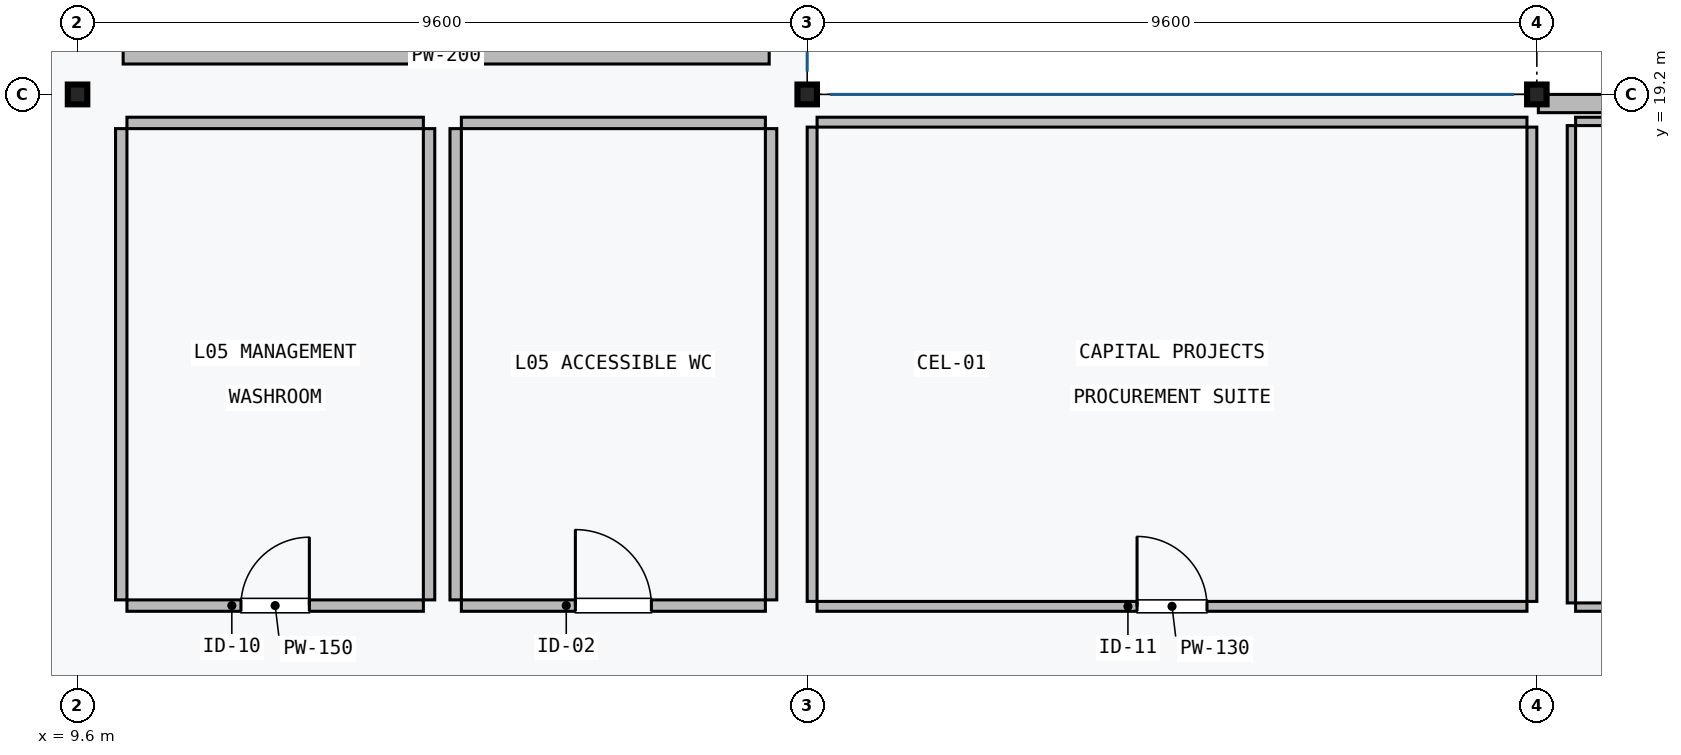
"""IFC4 building model, lengths in metres.
Left out: names, types, materials, properties, quantities, classifications, styles, units other than length and angle.
Written with IfcOpenShell. Run it as: python <this file> out.ifc"""

import sys

from ifc_helpers import new_model, si_unit, direction, frame, frame_2d, origin, origin_2d, place, context, subcontext, project, spatial, rectangle, i_section, extrude, element, fill, save


model = new_model("IFC4")
c1 = context("Model", 3, precision=1e-05, world=origin(), true_north=direction((0.0, 1.0)))
c2 = subcontext(c1, "Body", "Model", "MODEL_VIEW")
j1 = project(units=[si_unit("LENGTHUNIT", "METRE"), si_unit("PLANEANGLEUNIT", "RADIAN")], contexts=[c1])
p1 = place(None, origin())
s1 = spatial("IfcSite", under=j1, at=p1, CompositionType="ELEMENT")
p2 = place(p1, origin())
s2 = spatial("IfcBuilding", under=s1, at=p2, CompositionType="ELEMENT")
p3 = place(p2, frame((0.0, 0.0, 23.1)))
s3 = spatial("IfcBuildingStorey", under=s2, at=p3, CompositionType="ELEMENT", Elevation=23.1)
for number, where, z_axis, x_axis in (
    (1, (9.6, 19.2, 0.0), (0.0, 0.0, 1.0), (1.0, 0.0, 0.0)),
    (2, (19.2, 19.2, 0.0), (0.0, 0.0, 1.0), (1.0, 0.0, 0.0)),
    (3, (28.8, 19.2, 0.0), (0.0, 0.0, 1.0), (1.0, 0.0, 0.0)),
):
    element("IfcColumn", number, at=place(p3, frame(where, z_axis=z_axis, x_axis=x_axis)), inside=s3, PredefinedType="COLUMN", context=c2, shape_type="SweptSolid", body=[
        extrude(i_section(OverallWidth=0.256, OverallDepth=0.26, WebThickness=0.01, FlangeThickness=0.017, FilletRadius=0.013, at=origin_2d()), origin(), (0.0, 0.0, 1.0), 3.92),
    ])
p4 = place(p3, frame((28.82, 19.08, 0.0), z_axis=(0.0, 0.0, 1.0), x_axis=(1.0, 0.0, 0.0)))
e4 = element("IfcWall", 4, at=p4, inside=s3, PredefinedType="SOLIDWALL", context=c2, shape_type="SweptSolid", body=[
    extrude(rectangle(XDim=9.56, YDim=0.24, at=frame_2d((4.78, 0.0))), origin(), (0.0, 0.0, 1.0), 3.63),
])
p5 = place(p4, frame((4.18, 0.0, 0.9)))
e5 = element("IfcOpeningElement", 5, at=p5, cuts=e4, PredefinedType="OPENING", context=c2, shape_type="SweptSolid", body=[
    extrude(rectangle(XDim=1.2, YDim=1.8, at=frame_2d((0.6, 0.9))), frame((0.0, 0.13, 0.0), z_axis=(0.0, -1.0, 0.0), x_axis=(1.0, 0.0, 0.0)), (0.0, 0.0, 1.0), 0.26),
])
p6 = place(p3, frame((45.99, 12.455, 0.0), z_axis=(0.0, 0.0, 1.0), x_axis=(-1.0, 0.0, 0.0)))
e6 = element("IfcWall", 6, at=p6, inside=s3, PredefinedType="PARTITIONING", context=c2, shape_type="SweptSolid", body=[
    extrude(rectangle(XDim=16.68, YDim=0.11, at=frame_2d((8.34, 0.0))), origin(), (0.0, 0.0, 1.0), 3.453),
])
p7 = place(p6, frame((3.6, 0.0, 0.0)))
e7 = element("IfcOpeningElement", 7, at=p7, cuts=e6, PredefinedType="OPENING", context=c2, shape_type="SweptSolid", body=[
    extrude(rectangle(XDim=0.95, YDim=2.15, at=frame_2d((0.475, 1.075))), frame((0.0, 0.065, 0.0), z_axis=(0.0, -1.0, 0.0), x_axis=(1.0, 0.0, 0.0)), (0.0, 0.0, 1.0), 0.13),
])
p8 = place(p3, frame((29.31, 18.845, 0.0), z_axis=(0.0, 0.0, 1.0), x_axis=(1.0, 0.0, 0.0)))
e8 = element("IfcWall", 8, at=p8, inside=s3, PredefinedType="PARTITIONING", context=c2, shape_type="SweptSolid", body=[
    extrude(rectangle(XDim=16.68, YDim=0.11, at=frame_2d((8.34, 0.0))), origin(), (0.0, 0.0, 1.0), 3.453),
])
p9 = place(p3, frame((29.255, 12.51, 0.0), z_axis=(0.0, 0.0, 1.0), x_axis=(0.0, 1.0, 0.0)))
e9 = element("IfcWall", 9, at=p9, inside=s3, PredefinedType="PARTITIONING", context=c2, shape_type="SweptSolid", body=[
    extrude(rectangle(XDim=6.28, YDim=0.11, at=frame_2d((3.14, 0.0))), origin(), (0.0, 0.0, 1.0), 3.56),
])
p10 = place(p3, frame((28.67, 12.465, 0.0), z_axis=(0.0, 0.0, 1.0), x_axis=(-1.0, 0.0, 0.0)))
e10 = element("IfcWall", 10, at=p10, inside=s3, PredefinedType="PARTITIONING", context=c2, shape_type="SweptSolid", body=[
    extrude(rectangle(XDim=9.34, YDim=0.13, at=frame_2d((4.67, 0.0))), origin(), (0.0, 0.0, 1.0), 3.453),
])
p11 = place(p10, frame((4.21, 0.0, 0.0)))
e11 = element("IfcOpeningElement", 11, at=p11, cuts=e10, PredefinedType="OPENING", context=c2, shape_type="SweptSolid", body=[
    extrude(rectangle(XDim=0.92, YDim=2.15, at=frame_2d((0.46, 1.075))), frame((0.0, 0.075, 0.0), z_axis=(0.0, -1.0, 0.0), x_axis=(1.0, 0.0, 0.0)), (0.0, 0.0, 1.0), 0.15),
])
p12 = place(p3, frame((19.33, 18.835, 0.0), z_axis=(0.0, 0.0, 1.0), x_axis=(1.0, 0.0, 0.0)))
e12 = element("IfcWall", 12, at=p12, inside=s3, PredefinedType="PARTITIONING", context=c2, shape_type="SweptSolid", body=[
    extrude(rectangle(XDim=9.34, YDim=0.13, at=frame_2d((4.67, 0.0))), origin(), (0.0, 0.0, 1.0), 3.453),
])
for number, where, z_axis, x_axis in (
    (13, (19.265, 12.53, 0.0), (0.0, 0.0, 1.0), (0.0, 1.0, 0.0)),
    (14, (28.735, 18.77, 0.0), (0.0, 0.0, 1.0), (0.0, -1.0, 0.0)),
):
    element("IfcWall", number, at=place(p3, frame(where, z_axis=z_axis, x_axis=x_axis)), inside=s3, PredefinedType="PARTITIONING", context=c2, shape_type="SweptSolid", body=[
        extrude(rectangle(XDim=6.24, YDim=0.13, at=frame_2d((3.12, 0.0))), origin(), (0.0, 0.0, 1.0), 3.453),
    ])
p13 = place(p3, frame((18.7, 19.7, 0.0), z_axis=(0.0, 0.0, 1.0), x_axis=(-1.0, 0.0, 0.0)))
e15 = element("IfcWall", 15, at=p13, inside=s3, PredefinedType="PARTITIONING", context=c2, shape_type="SweptSolid", body=[
    extrude(rectangle(XDim=8.5, YDim=0.2, at=frame_2d((4.25, 0.0))), origin(), (0.0, 0.0, 1.0), 3.56),
])
p14 = place(p3, frame((14.15, 12.475, 0.0), z_axis=(0.0, 0.0, 1.0), x_axis=(-1.0, 0.0, 0.0)))
e16 = element("IfcWall", 16, at=p14, inside=s3, PredefinedType="PLUMBINGWALL", context=c2, shape_type="SweptSolid", body=[
    extrude(rectangle(XDim=3.9, YDim=0.15, at=frame_2d((1.95, 0.0))), origin(), (0.0, 0.0, 1.0), 3.56),
])
p15 = place(p14, frame((1.5, 0.0, 0.0)))
e17 = element("IfcOpeningElement", 17, at=p15, cuts=e16, PredefinedType="OPENING", context=c2, shape_type="SweptSolid", body=[
    extrude(rectangle(XDim=0.9, YDim=2.1, at=frame_2d((0.45, 1.05))), frame((0.0, 0.085, 0.0), z_axis=(0.0, -1.0, 0.0), x_axis=(1.0, 0.0, 0.0)), (0.0, 0.0, 1.0), 0.17),
])
p16 = place(p3, frame((10.25, 18.825, 0.0), z_axis=(0.0, 0.0, 1.0), x_axis=(1.0, 0.0, 0.0)))
e18 = element("IfcWall", 18, at=p16, inside=s3, PredefinedType="PLUMBINGWALL", context=c2, shape_type="SweptSolid", body=[
    extrude(rectangle(XDim=3.9, YDim=0.15, at=frame_2d((1.95, 0.0))), origin(), (0.0, 0.0, 1.0), 3.56),
])
for number, where, z_axis, x_axis in (
    (19, (10.175, 12.55, 0.0), (0.0, 0.0, 1.0), (0.0, 1.0, 0.0)),
    (20, (14.225, 18.75, 0.0), (0.0, 0.0, 1.0), (0.0, -1.0, 0.0)),
):
    element("IfcWall", number, at=place(p3, frame(where, z_axis=z_axis, x_axis=x_axis)), inside=s3, PredefinedType="PLUMBINGWALL", context=c2, shape_type="SweptSolid", body=[
        extrude(rectangle(XDim=6.2, YDim=0.15, at=frame_2d((3.1, 0.0))), origin(), (0.0, 0.0, 1.0), 3.56),
    ])
p17 = place(p3, frame((18.65, 12.475, 0.0), z_axis=(0.0, 0.0, 1.0), x_axis=(-1.0, 0.0, 0.0)))
e21 = element("IfcWall", 21, at=p17, inside=s3, PredefinedType="PLUMBINGWALL", context=c2, shape_type="SweptSolid", body=[
    extrude(rectangle(XDim=4.0, YDim=0.15, at=frame_2d((2.0, 0.0))), origin(), (0.0, 0.0, 1.0), 3.56),
])
p18 = place(p17, frame((1.5, 0.0, 0.0)))
e22 = element("IfcOpeningElement", 22, at=p18, cuts=e21, PredefinedType="OPENING", context=c2, shape_type="SweptSolid", body=[
    extrude(rectangle(XDim=1.0, YDim=2.15, at=frame_2d((0.5, 1.075))), frame((0.0, 0.085, 0.0), z_axis=(0.0, -1.0, 0.0), x_axis=(1.0, 0.0, 0.0)), (0.0, 0.0, 1.0), 0.17),
])
p19 = place(p3, frame((14.65, 18.825, 0.0), z_axis=(0.0, 0.0, 1.0), x_axis=(1.0, 0.0, 0.0)))
e23 = element("IfcWall", 23, at=p19, inside=s3, PredefinedType="PLUMBINGWALL", context=c2, shape_type="SweptSolid", body=[
    extrude(rectangle(XDim=4.0, YDim=0.15, at=frame_2d((2.0, 0.0))), origin(), (0.0, 0.0, 1.0), 3.56),
])
for number, where, z_axis, x_axis in (
    (24, (14.575, 12.55, 0.0), (0.0, 0.0, 1.0), (0.0, 1.0, 0.0)),
    (25, (18.725, 18.75, 0.0), (0.0, 0.0, 1.0), (0.0, -1.0, 0.0)),
):
    element("IfcWall", number, at=place(p3, frame(where, z_axis=z_axis, x_axis=x_axis)), inside=s3, PredefinedType="PLUMBINGWALL", context=c2, shape_type="SweptSolid", body=[
        extrude(rectangle(XDim=6.2, YDim=0.15, at=frame_2d((3.1, 0.0))), origin(), (0.0, 0.0, 1.0), 3.56),
    ])
p20 = place(p11, frame((0.92, 0.0, 0.0), z_axis=(0.0, 0.0, 1.0), x_axis=(-1.0, 0.0, 0.0)))
e26 = element("IfcDoor", 26, at=p20, inside=s3, OperationType="SINGLE_SWING_RIGHT", PredefinedType="DOOR", context=c2, shape_type="SweptSolid", body=[
    extrude(rectangle(XDim=0.92, YDim=2.15, at=frame_2d((0.46, 1.075))), frame((0.0, 0.025, 0.0), z_axis=(0.0, -1.0, 0.0), x_axis=(1.0, 0.0, 0.0)), (0.0, 0.0, 1.0), 0.05),
])
fill(e11, e26)
p21 = place(p15, frame((0.9, 0.0, 0.0), z_axis=(0.0, 0.0, 1.0), x_axis=(-1.0, 0.0, 0.0)))
e27 = element("IfcDoor", 27, at=p21, inside=s3, OperationType="SINGLE_SWING_LEFT", PredefinedType="DOOR", context=c2, shape_type="SweptSolid", body=[
    extrude(rectangle(XDim=0.9, YDim=2.1, at=frame_2d((0.45, 1.05))), frame((0.0, 0.025, 0.0), z_axis=(0.0, -1.0, 0.0), x_axis=(1.0, 0.0, 0.0)), (0.0, 0.0, 1.0), 0.05),
])
fill(e17, e27)
p22 = place(p18, frame((1.0, 0.0, 0.0), z_axis=(0.0, 0.0, 1.0), x_axis=(-1.0, 0.0, 0.0)))
e28 = element("IfcDoor", 28, at=p22, inside=s3, OperationType="SINGLE_SWING_RIGHT", PredefinedType="DOOR", context=c2, shape_type="SweptSolid", body=[
    extrude(rectangle(XDim=1.0, YDim=2.15, at=frame_2d((0.5, 1.075))), frame((0.0, 0.025, 0.0), z_axis=(0.0, -1.0, 0.0), x_axis=(1.0, 0.0, 0.0)), (0.0, 0.0, 1.0), 0.05),
])
fill(e22, e28)
save(model, sys.argv[1])
